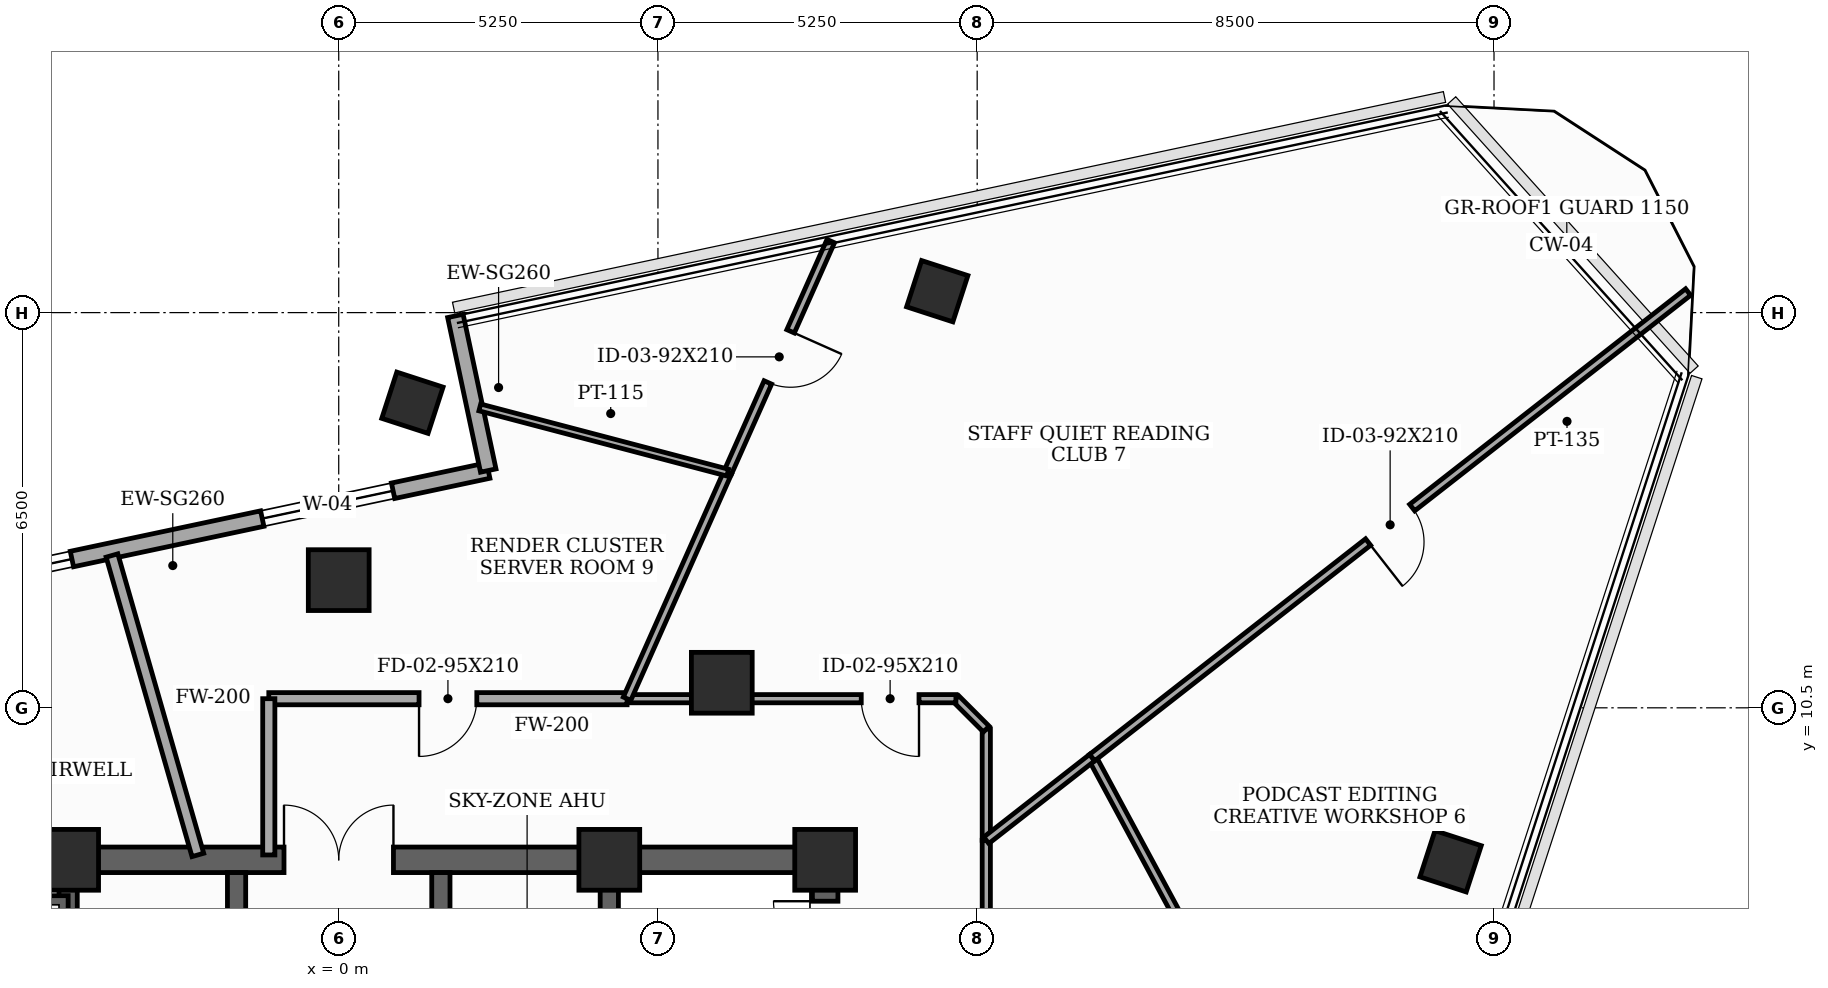
"""IFC4 building model, lengths in metres.
Left out: names, types, materials, properties, quantities, classifications, styles, units other than length and angle.
Written with IfcOpenShell. Run it as: python <this file> out.ifc"""

import sys

from ifc_helpers import new_model, si_unit, direction, frame, frame_2d, origin, origin_2d, place, context, subcontext, project, spatial, rectangle, extrude, element, fill, save


model = new_model("IFC4")
c1 = context("Model", 3, precision=1e-05, world=origin(), true_north=direction((0.0, 1.0)))
c2 = subcontext(c1, "Body", "Model", "MODEL_VIEW")
j1 = project(units=[si_unit("LENGTHUNIT", "METRE"), si_unit("PLANEANGLEUNIT", "RADIAN")], contexts=[c1])
p1 = place(None, origin())
s1 = spatial("IfcSite", under=j1, at=p1, CompositionType="ELEMENT")
p2 = place(p1, origin())
s2 = spatial("IfcBuilding", under=s1, at=p2, CompositionType="ELEMENT")
p3 = place(p2, frame((0.0, 0.0, 298.0)))
s3 = spatial("IfcBuildingStorey", under=s2, at=p3, CompositionType="ELEMENT", Elevation=298.0)
for number, where, z_axis, x_axis in (
    (1, (8.0, 8.0, 0.0), (0.0, 0.0, 1.0), (1.0, 0.0, 0.0)),
    (2, (4.45, 8.0, 0.0), (0.0, 0.0, 1.0), (1.0, 0.0, 0.0)),
    (3, (-4.45, 8.0, 0.0), (0.0, 0.0, 1.0), (1.0, 0.0, 0.0)),
    (4, (6.3, 10.912, 0.0), (0.0, 0.0, 1.0), (1.0, 0.0, 0.0)),
    (5, (0.0, 12.6, 0.0), (0.0, 0.0, 1.0), (1.0, 0.0, 0.0)),
):
    element("IfcColumn", number, at=place(p3, frame(where, z_axis=z_axis, x_axis=x_axis)), inside=s3, PredefinedType="COLUMN", context=c2, shape_type="SweptSolid", body=[
        extrude(rectangle(XDim=1.0, YDim=1.0, at=origin_2d()), origin(), (0.0, 0.0, 1.0), 3.7),
    ])
for number, where, z_axis, x_axis in (
    (6, (18.286, 7.976, 0.0), (0.0, 0.0, 1.0), (0.309, 0.951, 0.0)),
    (7, (9.844, 17.352, 0.0), (0.0, 0.0, 1.0), (0.309, 0.951, 0.0)),
    (8, (1.212, 15.518, 0.0), (0.0, 0.0, 1.0), (0.309, 0.951, 0.0)),
):
    element("IfcColumn", number, at=place(p3, frame(where, z_axis=z_axis, x_axis=x_axis)), inside=s3, PredefinedType="COLUMN", context=c2, shape_type="SweptSolid", body=[
        extrude(rectangle(XDim=0.8, YDim=0.8, at=origin_2d()), origin(), (0.0, 0.0, 1.0), 3.7),
    ])
p4 = place(p3, frame((2.459, 14.402, 0.0), z_axis=(0.0, 0.0, 1.0), x_axis=(-0.978149082982, -0.207904717268, 0.0)))
e9 = element("IfcWall", 9, at=p4, inside=s3, PredefinedType="SOLIDWALL", context=c2, shape_type="SweptSolid", body=[
    extrude(rectangle(XDim=10.8, YDim=0.26, at=frame_2d((5.4, 0.0))), origin(), (0.0, 0.0, 1.0), 3.5),
])
p5 = place(p4, frame((1.6, 0.0, 0.85)))
e10 = element("IfcOpeningElement", 10, at=p5, cuts=e9, PredefinedType="OPENING", context=c2, shape_type="SweptSolid", body=[
    extrude(rectangle(XDim=2.2, YDim=1.25, at=frame_2d((1.1, 0.625))), frame((0.0, 0.14, 0.0), z_axis=(0.0, -1.0, 0.0), x_axis=(1.0, 0.0, 0.0)), (0.0, 0.0, 1.0), 0.28),
])
p6 = place(p4, frame((7.0, 0.0, 0.85)))
e11 = element("IfcOpeningElement", 11, at=p6, cuts=e9, PredefinedType="OPENING", context=c2, shape_type="SweptSolid", body=[
    extrude(rectangle(XDim=2.2, YDim=1.25, at=frame_2d((1.1, 0.625))), frame((0.0, 0.14, 0.0), z_axis=(0.0, -1.0, 0.0), x_axis=(1.0, 0.0, 0.0)), (0.0, 0.0, 1.0), 0.28),
])
p7 = place(p3, frame((1.919, 16.946, 0.0), z_axis=(0.0, 0.0, 1.0), x_axis=(0.207893569688, -0.978151452323, 0.0)))
e12 = element("IfcWall", 12, at=p7, inside=s3, PredefinedType="SOLIDWALL", context=c2, shape_type="SweptSolid", body=[
    extrude(rectangle(XDim=2.6, YDim=0.26, at=frame_2d((1.3, 0.0))), origin(), (0.0, 0.0, 1.0), 3.5),
])
p8 = place(p3, frame((8.0, -8.0, 0.0), z_axis=(0.0, 0.0, 1.0), x_axis=(0.0, 1.0, 0.0)))
e13 = element("IfcWall", 13, at=p8, inside=s3, PredefinedType="SHEAR", context=c2, shape_type="SweptSolid", body=[
    extrude(rectangle(XDim=16.0, YDim=0.42, at=frame_2d((8.0, 0.0))), origin(), (0.0, 0.0, 1.0), 3.5),
])
p9 = place(p8, frame((9.6, 0.0, 0.0)))
e14 = element("IfcOpeningElement", 14, at=p9, cuts=e13, PredefinedType="OPENING", context=c2, shape_type="SweptSolid", body=[
    extrude(rectangle(XDim=1.05, YDim=2.15, at=frame_2d((0.525, 1.075))), frame((0.0, 0.22, 0.0), z_axis=(0.0, -1.0, 0.0), x_axis=(1.0, 0.0, 0.0)), (0.0, 0.0, 1.0), 0.44),
])
p10 = place(p8, frame((14.469, 0.0, 0.0)))
e15 = element("IfcOpeningElement", 15, at=p10, cuts=e13, PredefinedType="OPENING", context=c2, shape_type="SweptSolid", body=[
    extrude(rectangle(XDim=0.85, YDim=2.02, at=frame_2d((0.425, 1.01))), frame((0.0, 0.22, 0.0), z_axis=(0.0, -1.0, 0.0), x_axis=(1.0, 0.0, 0.0)), (0.0, 0.0, 1.0), 0.44),
])
p11 = place(p3, frame((-8.0, 8.0, 0.0), z_axis=(0.0, 0.0, 1.0), x_axis=(1.0, 0.0, 0.0)))
e16 = element("IfcWall", 16, at=p11, inside=s3, PredefinedType="SHEAR", context=c2, shape_type="SweptSolid", body=[
    extrude(rectangle(XDim=16.0, YDim=0.42, at=frame_2d((8.0, 0.0))), origin(), (0.0, 0.0, 1.0), 3.5),
])
p12 = place(p11, frame((7.1, 0.0, 0.0)))
e17 = element("IfcOpeningElement", 17, at=p12, cuts=e16, PredefinedType="OPENING", context=c2, shape_type="SweptSolid", body=[
    extrude(rectangle(XDim=1.8, YDim=2.15, at=frame_2d((0.9, 1.075))), frame((0.0, 0.22, 0.0), z_axis=(0.0, -1.0, 0.0), x_axis=(1.0, 0.0, 0.0)), (0.0, 0.0, 1.0), 0.44),
])
for number, where, z_axis, x_axis in (
    (18, (-4.45, -7.79, 0.0), (0.0, 0.0, 1.0), (0.0, 1.0, 0.0)),
    (19, (4.45, -7.79, 0.0), (0.0, 0.0, 1.0), (0.0, 1.0, 0.0)),
):
    element("IfcWall", number, at=place(p3, frame(where, z_axis=z_axis, x_axis=x_axis)), inside=s3, PredefinedType="SHEAR", context=c2, shape_type="SweptSolid", body=[
        extrude(rectangle(XDim=15.58, YDim=0.3, at=frame_2d((7.79, 0.0))), origin(), (0.0, 0.0, 1.0), 3.5),
    ])
p13 = place(p3, frame((-7.79, 7.26, 0.0), z_axis=(0.0, 0.0, 1.0), x_axis=(1.0, 0.0, 0.0)))
e20 = element("IfcWall", 20, at=p13, inside=s3, PredefinedType="SHEAR", context=c2, shape_type="SweptSolid", body=[
    extrude(rectangle(XDim=3.34, YDim=0.3, at=frame_2d((1.67, 0.0))), origin(), (0.0, 0.0, 1.0), 3.5),
])
p14 = place(p3, frame((-1.68, -4.85, 0.0), z_axis=(0.0, 0.0, 1.0), x_axis=(0.0, 1.0, 0.0)))
e21 = element("IfcWall", 21, at=p14, inside=s3, PredefinedType="SHEAR", context=c2, shape_type="SweptSolid", body=[
    extrude(rectangle(XDim=12.64, YDim=0.3, at=frame_2d((6.32, 0.0))), origin(), (0.0, 0.0, 1.0), 3.5),
])
p15 = place(p14, frame((3.5, 0.0, 0.0)))
e22 = element("IfcOpeningElement", 22, at=p15, cuts=e21, PredefinedType="OPENING", context=c2, shape_type="SweptSolid", body=[
    extrude(rectangle(XDim=0.95, YDim=2.1, at=frame_2d((0.475, 1.05))), frame((0.0, 0.16, 0.0), z_axis=(0.0, -1.0, 0.0), x_axis=(1.0, 0.0, 0.0)), (0.0, 0.0, 1.0), 0.32),
])
p16 = place(p14, frame((9.8, 0.0, 0.0)))
e23 = element("IfcOpeningElement", 23, at=p16, cuts=e21, PredefinedType="OPENING", context=c2, shape_type="SweptSolid", body=[
    extrude(rectangle(XDim=0.95, YDim=2.1, at=frame_2d((0.475, 1.05))), frame((0.0, 0.16, 0.0), z_axis=(0.0, -1.0, 0.0), x_axis=(1.0, 0.0, 0.0)), (0.0, 0.0, 1.0), 0.32),
])
p17 = place(p3, frame((1.68, -4.85, 0.0), z_axis=(0.0, 0.0, 1.0), x_axis=(0.0, 1.0, 0.0)))
e24 = element("IfcWall", 24, at=p17, inside=s3, PredefinedType="SHEAR", context=c2, shape_type="SweptSolid", body=[
    extrude(rectangle(XDim=12.64, YDim=0.3, at=frame_2d((6.32, 0.0))), origin(), (0.0, 0.0, 1.0), 3.5),
])
p18 = place(p17, frame((0.55, 0.0, 0.0)))
e25 = element("IfcOpeningElement", 25, at=p18, cuts=e24, PredefinedType="OPENING", context=c2, shape_type="SweptSolid", body=[
    extrude(rectangle(XDim=1.1, YDim=2.1, at=frame_2d((0.55, 1.05))), frame((0.0, 0.16, 0.0), z_axis=(0.0, -1.0, 0.0), x_axis=(1.0, 0.0, 0.0)), (0.0, 0.0, 1.0), 0.32),
])
p19 = place(p17, frame((2.65, 0.0, 0.0)))
e26 = element("IfcOpeningElement", 26, at=p19, cuts=e24, PredefinedType="OPENING", context=c2, shape_type="SweptSolid", body=[
    extrude(rectangle(XDim=1.1, YDim=2.1, at=frame_2d((0.55, 1.05))), frame((0.0, 0.16, 0.0), z_axis=(0.0, -1.0, 0.0), x_axis=(1.0, 0.0, 0.0)), (0.0, 0.0, 1.0), 0.32),
])
p20 = place(p17, frame((4.75, 0.0, 0.0)))
e27 = element("IfcOpeningElement", 27, at=p20, cuts=e24, PredefinedType="OPENING", context=c2, shape_type="SweptSolid", body=[
    extrude(rectangle(XDim=1.1, YDim=2.1, at=frame_2d((0.55, 1.05))), frame((0.0, 0.16, 0.0), z_axis=(0.0, -1.0, 0.0), x_axis=(1.0, 0.0, 0.0)), (0.0, 0.0, 1.0), 0.32),
])
p21 = place(p17, frame((8.9, 0.0, 0.0)))
e28 = element("IfcOpeningElement", 28, at=p21, cuts=e24, PredefinedType="OPENING", context=c2, shape_type="SweptSolid", body=[
    extrude(rectangle(XDim=0.95, YDim=2.1, at=frame_2d((0.475, 1.05))), frame((0.0, 0.16, 0.0), z_axis=(0.0, -1.0, 0.0), x_axis=(1.0, 0.0, 0.0)), (0.0, 0.0, 1.0), 0.32),
])
p22 = place(p3, frame((10.65, 4.225, 0.0), z_axis=(0.0, 0.0, 1.0), x_axis=(0.0, 1.0, 0.0)))
e29 = element("IfcWall", 29, at=p22, inside=s3, PredefinedType="PARTITIONING", context=c2, shape_type="SweptSolid", body=[
    extrude(rectangle(XDim=4.096, YDim=0.135, at=frame_2d((2.048, 0.0))), origin(), (0.0, 0.0, 1.0), 2.885),
])
p23 = place(p3, frame((10.65, 8.321, 0.0), z_axis=(0.0, 0.0, 1.0), x_axis=(0.0, 1.0, 0.0)))
e30 = element("IfcWall", 30, at=p23, inside=s3, PredefinedType="PARTITIONING", context=c2, shape_type="SweptSolid", body=[
    extrude(rectangle(XDim=1.829, YDim=0.135, at=frame_2d((0.915, 0.0))), origin(), (0.0, 0.0, 1.0), 3.5),
])
p24 = place(p3, frame((10.65, 10.15, 0.0), z_axis=(0.0, 0.0, 1.0), x_axis=(-0.707106781187, 0.707106781187, 0.0)))
e31 = element("IfcWall", 31, at=p24, inside=s3, PredefinedType="PARTITIONING", context=c2, shape_type="SweptSolid", body=[
    extrude(rectangle(XDim=0.707, YDim=0.135, at=frame_2d((0.354, 0.0))), origin(), (0.0, 0.0, 1.0), 3.5),
])
p25 = place(p3, frame((10.15, 10.65, 0.0), z_axis=(0.0, 0.0, 1.0), x_axis=(-1.0, 0.0, 0.0)))
e32 = element("IfcWall", 32, at=p25, inside=s3, PredefinedType="PARTITIONING", context=c2, shape_type="SweptSolid", body=[
    extrude(rectangle(XDim=5.408, YDim=0.135, at=frame_2d((2.704, 0.0))), origin(), (0.0, 0.0, 1.0), 2.885),
])
p26 = place(p25, frame((0.607, 0.0, 0.0)))
e33 = element("IfcOpeningElement", 33, at=p26, cuts=e32, PredefinedType="OPENING", context=c2, shape_type="SweptSolid", body=[
    extrude(rectangle(XDim=0.95, YDim=2.1, at=frame_2d((0.475, 1.05))), frame((0.0, 0.077, 0.0), z_axis=(0.0, -1.0, 0.0), x_axis=(1.0, 0.0, 0.0)), (0.0, 0.0, 1.0), 0.155),
])
p27 = place(p3, frame((4.742, 10.65, 0.0), z_axis=(0.0, 0.0, 1.0), x_axis=(-1.0, 0.0, 0.0)))
e34 = element("IfcWall", 34, at=p27, inside=s3, PredefinedType="SOLIDWALL", context=c2, shape_type="SweptSolid", body=[
    extrude(rectangle(XDim=5.892, YDim=0.2, at=frame_2d((2.946, 0.0))), origin(), (0.0, 0.0, 1.0), 2.885),
])
p28 = place(p27, frame((2.471, 0.0, 0.0)))
e35 = element("IfcOpeningElement", 35, at=p28, cuts=e34, PredefinedType="OPENING", context=c2, shape_type="SweptSolid", body=[
    extrude(rectangle(XDim=0.95, YDim=2.1, at=frame_2d((0.475, 1.05))), frame((0.0, 0.11, 0.0), z_axis=(0.0, -1.0, 0.0), x_axis=(1.0, 0.0, 0.0)), (0.0, 0.0, 1.0), 0.22),
])
p29 = place(p3, frame((-1.15, 10.65, 0.0), z_axis=(0.0, 0.0, 1.0), x_axis=(0.0, -1.0, 0.0)))
e36 = element("IfcWall", 36, at=p29, inside=s3, PredefinedType="SOLIDWALL", context=c2, shape_type="SweptSolid", body=[
    extrude(rectangle(XDim=2.57, YDim=0.2, at=frame_2d((1.285, 0.0))), origin(), (0.0, 0.0, 1.0), 2.885),
])
p30 = place(p3, frame((15.096, 4.663, 0.0), z_axis=(0.0, 0.0, 1.0), x_axis=(-0.474498198469, 0.88025647379, 0.0)))
e37 = element("IfcWall", 37, at=p30, inside=s3, PredefinedType="PARTITIONING", context=c2, shape_type="SweptSolid", body=[
    extrude(rectangle(XDim=5.7, YDim=0.135, at=frame_2d((2.85, 0.0))), origin(), (0.0, 0.0, 1.0), 3.035),
])
p31 = place(p3, frame((12.391, 9.681, 0.0), z_axis=(0.0, 0.0, 1.0), x_axis=(-0.788124883644, -0.615515367624, 0.0)))
e38 = element("IfcWall", 38, at=p31, inside=s3, PredefinedType="PARTITIONING", context=c2, shape_type="SweptSolid", body=[
    extrude(rectangle(XDim=2.209, YDim=0.135, at=frame_2d((1.104, 0.0))), origin(), (0.0, 0.0, 1.0), 3.5),
])
p32 = place(p3, frame((22.192, 17.338, 0.0), z_axis=(0.0, 0.0, 1.0), x_axis=(-0.788015446076, -0.615655469192, 0.0)))
e39 = element("IfcWall", 39, at=p32, inside=s3, PredefinedType="PARTITIONING", context=c2, shape_type="SweptSolid", body=[
    extrude(rectangle(XDim=12.438, YDim=0.135, at=frame_2d((6.219, 0.0))), origin(), (0.0, 0.0, 1.0), 3.035),
])
p33 = place(p32, frame((5.759, 0.0, 0.0)))
e40 = element("IfcOpeningElement", 40, at=p33, cuts=e39, PredefinedType="OPENING", context=c2, shape_type="SweptSolid", body=[
    extrude(rectangle(XDim=0.92, YDim=2.1, at=frame_2d((0.46, 1.05))), frame((0.0, 0.077, 0.0), z_axis=(0.0, -1.0, 0.0), x_axis=(1.0, 0.0, 0.0)), (0.0, 0.0, 1.0), 0.155),
])
p34 = place(p3, frame((8.092, 18.176, 0.0), z_axis=(0.0, 0.0, 1.0), x_axis=(-0.406654666586, -0.91358195152, 0.0)))
e41 = element("IfcWall", 41, at=p34, inside=s3, PredefinedType="PARTITIONING", context=c2, shape_type="SweptSolid", body=[
    extrude(rectangle(XDim=4.168, YDim=0.135, at=frame_2d((2.084, 0.0))), origin(), (0.0, 0.0, 1.0), 3.035),
])
p35 = place(p34, frame((1.624, 0.0, 0.0)))
e42 = element("IfcOpeningElement", 42, at=p35, cuts=e41, PredefinedType="OPENING", context=c2, shape_type="SweptSolid", body=[
    extrude(rectangle(XDim=0.92, YDim=2.1, at=frame_2d((0.46, 1.05))), frame((0.0, 0.077, 0.0), z_axis=(0.0, -1.0, 0.0), x_axis=(1.0, 0.0, 0.0)), (0.0, 0.0, 1.0), 0.155),
])
p36 = place(p3, frame((6.397, 14.368, 0.0), z_axis=(0.0, 0.0, 1.0), x_axis=(-0.406667169341, -0.913576386177, 0.0)))
e43 = element("IfcWall", 43, at=p36, inside=s3, PredefinedType="PARTITIONING", context=c2, shape_type="SweptSolid", body=[
    extrude(rectangle(XDim=4.07, YDim=0.135, at=frame_2d((2.035, 0.0))), origin(), (0.0, 0.0, 1.0), 2.885),
])
p37 = place(p3, frame((2.32, 15.44, 0.0), z_axis=(0.0, 0.0, 1.0), x_axis=(0.967091789993, -0.254427729874, 0.0)))
e44 = element("IfcWall", 44, at=p37, inside=s3, PredefinedType="PARTITIONING", context=c2, shape_type="SweptSolid", body=[
    extrude(rectangle(XDim=4.215, YDim=0.115, at=frame_2d((2.108, 0.0))), origin(), (0.0, 0.0, 1.0), 3.5),
])
p38 = place(p3, frame((-3.729, 13.005, 0.0), z_axis=(0.0, 0.0, 1.0), x_axis=(0.275658725111, -0.961255568135, 0.0)))
e45 = element("IfcWall", 45, at=p38, inside=s3, PredefinedType="SOLIDWALL", context=c2, shape_type="SweptSolid", body=[
    extrude(rectangle(XDim=5.124, YDim=0.2, at=frame_2d((2.562, 0.0))), origin(), (0.0, 0.0, 1.0), 2.885),
])
p39 = place(p5, origin())
e46 = element("IfcWindow", 46, at=p39, inside=s3, PartitioningType="SINGLE_PANEL", PredefinedType="WINDOW", context=c2, shape_type="SweptSolid", body=[
    extrude(rectangle(XDim=2.2, YDim=1.25, at=frame_2d((1.1, 0.625))), frame((0.0, 0.03, 0.0), z_axis=(0.0, -1.0, 0.0), x_axis=(1.0, 0.0, 0.0)), (0.0, 0.0, 1.0), 0.06),
])
fill(e10, e46)
p40 = place(p6, origin())
e47 = element("IfcWindow", 47, at=p40, inside=s3, PartitioningType="SINGLE_PANEL", PredefinedType="WINDOW", context=c2, shape_type="SweptSolid", body=[
    extrude(rectangle(XDim=2.2, YDim=1.25, at=frame_2d((1.1, 0.625))), frame((0.0, 0.03, 0.0), z_axis=(0.0, -1.0, 0.0), x_axis=(1.0, 0.0, 0.0)), (0.0, 0.0, 1.0), 0.06),
])
fill(e11, e47)
p41 = place(p10, origin())
e48 = element("IfcDoor", 48, at=p41, inside=s3, OperationType="SINGLE_SWING_RIGHT", PredefinedType="TRAPDOOR", context=c2, shape_type="SweptSolid", body=[
    extrude(rectangle(XDim=0.85, YDim=2.02, at=frame_2d((0.425, 1.01))), frame((0.0, 0.025, 0.0), z_axis=(0.0, -1.0, 0.0), x_axis=(1.0, 0.0, 0.0)), (0.0, 0.0, 1.0), 0.05),
])
fill(e15, e48)
p42 = place(p12, origin())
e49 = element("IfcDoor", 49, at=p42, inside=s3, OperationType="DOUBLE_DOOR_SINGLE_SWING", PredefinedType="DOOR", context=c2, shape_type="SweptSolid", body=[
    extrude(rectangle(XDim=1.8, YDim=2.15, at=frame_2d((0.9, 1.075))), frame((0.0, 0.025, 0.0), z_axis=(0.0, -1.0, 0.0), x_axis=(1.0, 0.0, 0.0)), (0.0, 0.0, 1.0), 0.05),
])
fill(e17, e49)
p43 = place(p26, origin())
e50 = element("IfcDoor", 50, at=p43, inside=s3, OperationType="SINGLE_SWING_LEFT", PredefinedType="DOOR", context=c2, shape_type="SweptSolid", body=[
    extrude(rectangle(XDim=0.95, YDim=2.1, at=frame_2d((0.475, 1.05))), frame((0.0, 0.025, 0.0), z_axis=(0.0, -1.0, 0.0), x_axis=(1.0, 0.0, 0.0)), (0.0, 0.0, 1.0), 0.05),
])
fill(e33, e50)
p44 = place(p28, origin())
e51 = element("IfcDoor", 51, at=p44, inside=s3, OperationType="SINGLE_SWING_RIGHT", PredefinedType="DOOR", context=c2, shape_type="SweptSolid", body=[
    extrude(rectangle(XDim=0.95, YDim=2.1, at=frame_2d((0.475, 1.05))), frame((0.0, 0.025, 0.0), z_axis=(0.0, -1.0, 0.0), x_axis=(1.0, 0.0, 0.0)), (0.0, 0.0, 1.0), 0.05),
])
fill(e35, e51)
p45 = place(p33, origin())
e52 = element("IfcDoor", 52, at=p45, inside=s3, OperationType="SINGLE_SWING_RIGHT", PredefinedType="DOOR", context=c2, shape_type="SweptSolid", body=[
    extrude(rectangle(XDim=0.92, YDim=2.1, at=frame_2d((0.46, 1.05))), frame((0.0, 0.025, 0.0), z_axis=(0.0, -1.0, 0.0), x_axis=(1.0, 0.0, 0.0)), (0.0, 0.0, 1.0), 0.05),
])
fill(e40, e52)
p46 = place(p35, origin())
e53 = element("IfcDoor", 53, at=p46, inside=s3, OperationType="SINGLE_SWING_LEFT", PredefinedType="DOOR", context=c2, shape_type="SweptSolid", body=[
    extrude(rectangle(XDim=0.92, YDim=2.1, at=frame_2d((0.46, 1.05))), frame((0.0, 0.025, 0.0), z_axis=(0.0, -1.0, 0.0), x_axis=(1.0, 0.0, 0.0)), (0.0, 0.0, 1.0), 0.05),
])
fill(e42, e53)
save(model, sys.argv[1])
